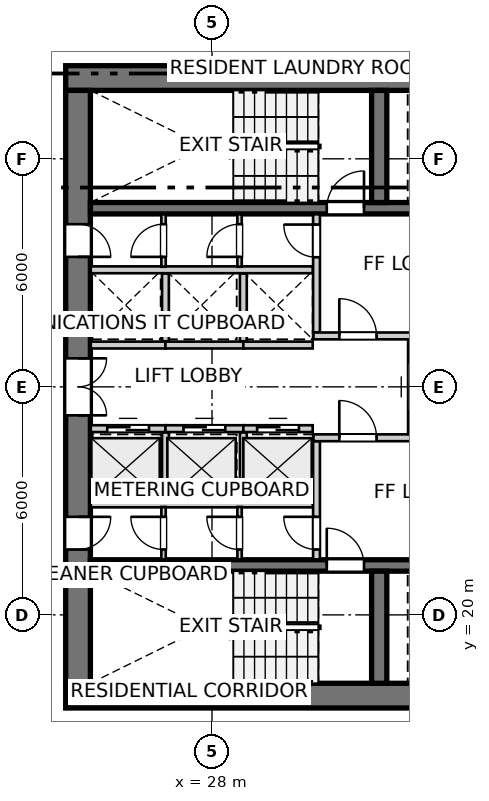
"""IFC4 building model, lengths in metres.
Left out: names, types, materials, properties, quantities, classifications, styles, units other than length and angle.
Written with IfcOpenShell. Run it as: python <this file> out.ifc"""

import sys

from ifc_helpers import new_model, si_unit, direction, frame, frame_2d, origin, place, context, subcontext, project, spatial, rectangle, extrude, source, transform, mapped, element, fill, save


model = new_model("IFC4")
c1 = context("Model", 3, precision=1e-05, world=origin(), true_north=direction((0.0, 1.0)))
c2 = subcontext(c1, "Body", "Model", "MODEL_VIEW")
j1 = project(units=[si_unit("LENGTHUNIT", "METRE"), si_unit("PLANEANGLEUNIT", "RADIAN")], contexts=[c1])
p1 = place(None, origin())
s1 = spatial("IfcSite", under=j1, at=p1, CompositionType="ELEMENT")
p2 = place(p1, origin())
s2 = spatial("IfcBuilding", under=s1, at=p2, CompositionType="ELEMENT")
p3 = place(p2, frame((0.0, 0.0, 89.6)))
s3 = spatial("IfcBuildingStorey", under=s2, at=p3, CompositionType="ELEMENT", Elevation=89.6)
for number, where, z_axis, x_axis in (
    (1, (24.15, 17.875, 0.0), (0.0, 0.0, 1.0), (1.0, 0.0, 0.0)),
    (2, (36.55, 34.125, 0.0), (0.0, 0.0, 1.0), (-1.0, 0.0, 0.0)),
):
    element("IfcWall", number, at=place(p3, frame(where, z_axis=z_axis, x_axis=x_axis)), inside=s3, PredefinedType="SHEAR", context=c2, shape_type="SweptSolid", body=[
        extrude(rectangle(XDim=12.4, YDim=0.65, at=frame_2d((6.2, 0.0))), origin(), (0.0, 0.0, 1.0), 2.95),
    ])
p4 = place(p3, frame((24.475, 33.8, 0.0), z_axis=(0.0, 0.0, 1.0), x_axis=(0.0, -1.0, 0.0)))
e3 = element("IfcWall", 3, at=p4, inside=s3, PredefinedType="SHEAR", context=c2, shape_type="SweptSolid", body=[
    extrude(rectangle(XDim=15.6, YDim=0.65, at=frame_2d((7.8, 0.0))), origin(), (0.0, 0.0, 1.0), 2.95),
])
p5 = place(p4, frame((7.05, 0.0, 0.0)))
e4 = element("IfcOpeningElement", 4, at=p5, cuts=e3, PredefinedType="OPENING", context=c2, shape_type="SweptSolid", body=[
    extrude(rectangle(XDim=1.5, YDim=2.15, at=frame_2d((0.75, 1.075))), frame((0.0, 0.335, 0.0), z_axis=(0.0, -1.0, 0.0), x_axis=(1.0, 0.0, 0.0)), (0.0, 0.0, 1.0), 0.67),
])
p6 = place(p4, frame((3.52, 0.0, 0.0)))
e5 = element("IfcOpeningElement", 5, at=p6, cuts=e3, PredefinedType="OPENING", context=c2, shape_type="SweptSolid", body=[
    extrude(rectangle(XDim=0.86, YDim=2.05, at=frame_2d((0.43, 1.025))), frame((0.0, 0.335, 0.0), z_axis=(0.0, -1.0, 0.0), x_axis=(1.0, 0.0, 0.0)), (0.0, 0.0, 1.0), 0.67),
])
p7 = place(p4, frame((11.22, 0.0, 0.0)))
e6 = element("IfcOpeningElement", 6, at=p7, cuts=e3, PredefinedType="OPENING", context=c2, shape_type="SweptSolid", body=[
    extrude(rectangle(XDim=0.86, YDim=2.05, at=frame_2d((0.43, 1.025))), frame((0.0, 0.335, 0.0), z_axis=(0.0, -1.0, 0.0), x_axis=(1.0, 0.0, 0.0)), (0.0, 0.0, 1.0), 0.67),
])
p8 = place(p3, frame((24.8, 21.3, 0.0), z_axis=(0.0, 0.0, 1.0), x_axis=(1.0, 0.0, 0.0)))
e7 = element("IfcWall", 7, at=p8, inside=s3, PredefinedType="SHEAR", context=c2, shape_type="SweptSolid", body=[
    extrude(rectangle(XDim=11.1, YDim=0.3, at=frame_2d((5.55, 0.0))), origin(), (0.0, 0.0, 1.0), 2.95),
])
p9 = place(p8, frame((6.22, 0.0, 0.0)))
e8 = element("IfcOpeningElement", 8, at=p9, cuts=e7, PredefinedType="OPENING", context=c2, shape_type="SweptSolid", body=[
    extrude(rectangle(XDim=0.98, YDim=2.15, at=frame_2d((0.49, 1.075))), frame((0.0, 0.16, 0.0), z_axis=(0.0, -1.0, 0.0), x_axis=(1.0, 0.0, 0.0)), (0.0, 0.0, 1.0), 0.32),
])
p10 = place(p8, frame((9.15, 0.0, 0.0)))
e9 = element("IfcOpeningElement", 9, at=p10, cuts=e7, PredefinedType="OPENING", context=c2, shape_type="SweptSolid", body=[
    extrude(rectangle(XDim=1.15, YDim=2.15, at=frame_2d((0.575, 1.075))), frame((0.0, 0.16, 0.0), z_axis=(0.0, -1.0, 0.0), x_axis=(1.0, 0.0, 0.0)), (0.0, 0.0, 1.0), 0.32),
])
p11 = place(p3, frame((32.4, 18.2, 0.0), z_axis=(0.0, 0.0, 1.0), x_axis=(0.0, 1.0, 0.0)))
e10 = element("IfcWall", 10, at=p11, inside=s3, PredefinedType="SHEAR", context=c2, shape_type="SweptSolid", body=[
    extrude(rectangle(XDim=2.95, YDim=0.4, at=frame_2d((1.475, 0.0))), origin(), (0.0, 0.0, 1.0), 2.95),
])
p12 = place(p3, frame((24.8, 30.7, 0.0), z_axis=(0.0, 0.0, 1.0), x_axis=(1.0, 0.0, 0.0)))
e11 = element("IfcWall", 11, at=p12, inside=s3, PredefinedType="SHEAR", context=c2, shape_type="SweptSolid", body=[
    extrude(rectangle(XDim=11.1, YDim=0.3, at=frame_2d((5.55, 0.0))), origin(), (0.0, 0.0, 1.0), 2.95),
])
p13 = place(p12, frame((6.22, 0.0, 0.0)))
e12 = element("IfcOpeningElement", 12, at=p13, cuts=e11, PredefinedType="OPENING", context=c2, shape_type="SweptSolid", body=[
    extrude(rectangle(XDim=0.98, YDim=2.15, at=frame_2d((0.49, 1.075))), frame((0.0, 0.16, 0.0), z_axis=(0.0, -1.0, 0.0), x_axis=(1.0, 0.0, 0.0)), (0.0, 0.0, 1.0), 0.32),
])
p14 = place(p12, frame((9.15, 0.0, 0.0)))
e13 = element("IfcOpeningElement", 13, at=p14, cuts=e11, PredefinedType="OPENING", context=c2, shape_type="SweptSolid", body=[
    extrude(rectangle(XDim=1.15, YDim=2.15, at=frame_2d((0.575, 1.075))), frame((0.0, 0.16, 0.0), z_axis=(0.0, -1.0, 0.0), x_axis=(1.0, 0.0, 0.0)), (0.0, 0.0, 1.0), 0.32),
])
p15 = place(p3, frame((32.4, 30.85, 0.0), z_axis=(0.0, 0.0, 1.0), x_axis=(0.0, 1.0, 0.0)))
e14 = element("IfcWall", 14, at=p15, inside=s3, PredefinedType="SHEAR", context=c2, shape_type="SweptSolid", body=[
    extrude(rectangle(XDim=2.95, YDim=0.4, at=frame_2d((1.475, 0.0))), origin(), (0.0, 0.0, 1.0), 2.95),
])
p16 = place(p3, frame((30.75, 21.46, 0.0), z_axis=(0.0, 0.0, 1.0), x_axis=(0.0, 1.0, 0.0)))
e15 = element("IfcWall", 15, at=p16, inside=s3, PredefinedType="PARTITIONING", context=c2, shape_type="SweptSolid", body=[
    extrude(rectangle(XDim=3.11, YDim=0.18, at=frame_2d((1.555, 0.0))), origin(), (0.0, 0.0, 1.0), 2.95),
])
p17 = place(p16, frame((0.26, 0.0, 0.0)))
e16 = element("IfcOpeningElement", 16, at=p17, cuts=e15, PredefinedType="OPENING", context=c2, shape_type="SweptSolid", body=[
    extrude(rectangle(XDim=0.86, YDim=2.05, at=frame_2d((0.43, 1.025))), frame((0.0, 0.1, 0.0), z_axis=(0.0, -1.0, 0.0), x_axis=(1.0, 0.0, 0.0)), (0.0, 0.0, 1.0), 0.2),
])
p18 = place(p3, frame((30.67, 24.66, 0.0), z_axis=(0.0, 0.0, 1.0), x_axis=(1.0, 0.0, 0.0)))
e17 = element("IfcWall", 17, at=p18, inside=s3, PredefinedType="PARTITIONING", context=c2, shape_type="SweptSolid", body=[
    extrude(rectangle(XDim=5.22, YDim=0.18, at=frame_2d((2.61, 0.0))), origin(), (0.0, 0.0, 1.0), 2.95),
])
p19 = place(p18, frame((0.68, 0.0, 0.0)))
e18 = element("IfcOpeningElement", 18, at=p19, cuts=e17, PredefinedType="OPENING", context=c2, shape_type="SweptSolid", body=[
    extrude(rectangle(XDim=0.98, YDim=2.15, at=frame_2d((0.49, 1.075))), frame((0.0, 0.1, 0.0), z_axis=(0.0, -1.0, 0.0), x_axis=(1.0, 0.0, 0.0)), (0.0, 0.0, 1.0), 0.2),
])
p20 = place(p3, frame((30.75, 27.43, 0.0), z_axis=(0.0, 0.0, 1.0), x_axis=(0.0, 1.0, 0.0)))
e19 = element("IfcWall", 19, at=p20, inside=s3, PredefinedType="PARTITIONING", context=c2, shape_type="SweptSolid", body=[
    extrude(rectangle(XDim=3.11, YDim=0.18, at=frame_2d((1.555, 0.0))), origin(), (0.0, 0.0, 1.0), 2.95),
])
p21 = place(p20, frame((1.98, 0.0, 0.0)))
e20 = element("IfcOpeningElement", 20, at=p21, cuts=e19, PredefinedType="OPENING", context=c2, shape_type="SweptSolid", body=[
    extrude(rectangle(XDim=0.86, YDim=2.05, at=frame_2d((0.43, 1.025))), frame((0.0, 0.1, 0.0), z_axis=(0.0, -1.0, 0.0), x_axis=(1.0, 0.0, 0.0)), (0.0, 0.0, 1.0), 0.2),
])
p22 = place(p3, frame((30.67, 27.34, 0.0), z_axis=(0.0, 0.0, 1.0), x_axis=(1.0, 0.0, 0.0)))
e21 = element("IfcWall", 21, at=p22, inside=s3, PredefinedType="PARTITIONING", context=c2, shape_type="SweptSolid", body=[
    extrude(rectangle(XDim=5.22, YDim=0.18, at=frame_2d((2.61, 0.0))), origin(), (0.0, 0.0, 1.0), 2.95),
])
p23 = place(p22, frame((0.68, 0.0, 0.0)))
e22 = element("IfcOpeningElement", 22, at=p23, cuts=e21, PredefinedType="OPENING", context=c2, shape_type="SweptSolid", body=[
    extrude(rectangle(XDim=0.98, YDim=2.15, at=frame_2d((0.49, 1.075))), frame((0.0, 0.1, 0.0), z_axis=(0.0, -1.0, 0.0), x_axis=(1.0, 0.0, 0.0)), (0.0, 0.0, 1.0), 0.2),
])
p24 = place(p3, frame((33.25, 24.76, 0.0), z_axis=(0.0, 0.0, 1.0), x_axis=(0.0, 1.0, 0.0)))
e23 = element("IfcWall", 23, at=p24, inside=s3, PredefinedType="PARTITIONING", context=c2, shape_type="SweptSolid", body=[
    extrude(rectangle(XDim=2.48, YDim=0.18, at=frame_2d((1.24, 0.0))), origin(), (0.0, 0.0, 1.0), 2.95),
])
p25 = place(p24, frame((0.615, 0.0, 0.0)))
e24 = element("IfcOpeningElement", 24, at=p25, cuts=e23, PredefinedType="OPENING", context=c2, shape_type="SweptSolid", body=[
    extrude(rectangle(XDim=1.25, YDim=2.15, at=frame_2d((0.625, 1.075))), frame((0.0, 0.1, 0.0), z_axis=(0.0, -1.0, 0.0), x_axis=(1.0, 0.0, 0.0)), (0.0, 0.0, 1.0), 0.2),
])
p26 = place(p3, frame((24.81, 22.92, 0.0), z_axis=(0.0, 0.0, 1.0), x_axis=(1.0, 0.0, 0.0)))
e25 = element("IfcWall", 25, at=p26, inside=s3, PredefinedType="PARTITIONING", context=c2, shape_type="SweptSolid", body=[
    extrude(rectangle(XDim=5.84, YDim=0.18, at=frame_2d((2.92, 0.0))), origin(), (0.0, 0.0, 1.0), 2.95),
])
p27 = place(p3, frame((24.81, 24.9, 0.0), z_axis=(0.0, 0.0, 1.0), x_axis=(1.0, 0.0, 0.0)))
e26 = element("IfcWall", 26, at=p27, inside=s3, PredefinedType="PARTITIONING", context=c2, shape_type="SweptSolid", body=[
    extrude(rectangle(XDim=1.965, YDim=0.18, at=frame_2d((0.982, 0.0))), origin(), (0.0, 0.0, 1.0), 2.95),
])
p28 = place(p27, frame((0.433, 0.0, 0.0)))
e27 = element("IfcOpeningElement", 27, at=p28, cuts=e26, PredefinedType="OPENING", context=c2, shape_type="SweptSolid", body=[
    extrude(rectangle(XDim=1.1, YDim=2.15, at=frame_2d((0.55, 1.075))), frame((0.0, 0.1, 0.0), z_axis=(0.0, -1.0, 0.0), x_axis=(1.0, 0.0, 0.0)), (0.0, 0.0, 1.0), 0.2),
])
p29 = place(p3, frame((26.775, 24.9, 0.0), z_axis=(0.0, 0.0, 1.0), x_axis=(1.0, 0.0, 0.0)))
e28 = element("IfcWall", 28, at=p29, inside=s3, PredefinedType="PARTITIONING", context=c2, shape_type="SweptSolid", body=[
    extrude(rectangle(XDim=2.05, YDim=0.18, at=frame_2d((1.025, 0.0))), origin(), (0.0, 0.0, 1.0), 2.95),
])
p30 = place(p29, frame((0.475, 0.0, 0.0)))
e29 = element("IfcOpeningElement", 29, at=p30, cuts=e28, PredefinedType="OPENING", context=c2, shape_type="SweptSolid", body=[
    extrude(rectangle(XDim=1.1, YDim=2.15, at=frame_2d((0.55, 1.075))), frame((0.0, 0.1, 0.0), z_axis=(0.0, -1.0, 0.0), x_axis=(1.0, 0.0, 0.0)), (0.0, 0.0, 1.0), 0.2),
])
p31 = place(p3, frame((26.775, 23.02, 0.0), z_axis=(0.0, 0.0, 1.0), x_axis=(0.0, 1.0, 0.0)))
e30 = element("IfcWall", 30, at=p31, inside=s3, PredefinedType="PARTITIONING", context=c2, shape_type="SweptSolid", body=[
    extrude(rectangle(XDim=1.78, YDim=0.18, at=frame_2d((0.89, 0.0))), origin(), (0.0, 0.0, 1.0), 2.95),
])
p32 = place(p3, frame((28.825, 24.9, 0.0), z_axis=(0.0, 0.0, 1.0), x_axis=(1.0, 0.0, 0.0)))
e31 = element("IfcWall", 31, at=p32, inside=s3, PredefinedType="PARTITIONING", context=c2, shape_type="SweptSolid", body=[
    extrude(rectangle(XDim=1.825, YDim=0.18, at=frame_2d((0.913, 0.0))), origin(), (0.0, 0.0, 1.0), 2.95),
])
p33 = place(p32, frame((0.363, 0.0, 0.0)))
e32 = element("IfcOpeningElement", 32, at=p33, cuts=e31, PredefinedType="OPENING", context=c2, shape_type="SweptSolid", body=[
    extrude(rectangle(XDim=1.1, YDim=2.15, at=frame_2d((0.55, 1.075))), frame((0.0, 0.1, 0.0), z_axis=(0.0, -1.0, 0.0), x_axis=(1.0, 0.0, 0.0)), (0.0, 0.0, 1.0), 0.2),
])
p34 = place(p3, frame((28.825, 23.02, 0.0), z_axis=(0.0, 0.0, 1.0), x_axis=(0.0, 1.0, 0.0)))
e33 = element("IfcWall", 33, at=p34, inside=s3, PredefinedType="PARTITIONING", context=c2, shape_type="SweptSolid", body=[
    extrude(rectangle(XDim=1.78, YDim=0.18, at=frame_2d((0.89, 0.0))), origin(), (0.0, 0.0, 1.0), 2.95),
])
p35 = place(p3, frame((24.81, 29.08, 0.0), z_axis=(0.0, 0.0, 1.0), x_axis=(1.0, 0.0, 0.0)))
e34 = element("IfcWall", 34, at=p35, inside=s3, PredefinedType="PARTITIONING", context=c2, shape_type="SweptSolid", body=[
    extrude(rectangle(XDim=5.84, YDim=0.18, at=frame_2d((2.92, 0.0))), origin(), (0.0, 0.0, 1.0), 2.95),
])
p36 = place(p3, frame((24.81, 27.1, 0.0), z_axis=(0.0, 0.0, 1.0), x_axis=(1.0, 0.0, 0.0)))
e35 = element("IfcWall", 35, at=p36, inside=s3, PredefinedType="PARTITIONING", context=c2, shape_type="SweptSolid", body=[
    extrude(rectangle(XDim=1.965, YDim=0.18, at=frame_2d((0.982, 0.0))), origin(), (0.0, 0.0, 1.0), 2.95),
])
p37 = place(p3, frame((26.775, 27.1, 0.0), z_axis=(0.0, 0.0, 1.0), x_axis=(1.0, 0.0, 0.0)))
e36 = element("IfcWall", 36, at=p37, inside=s3, PredefinedType="PARTITIONING", context=c2, shape_type="SweptSolid", body=[
    extrude(rectangle(XDim=2.05, YDim=0.18, at=frame_2d((1.025, 0.0))), origin(), (0.0, 0.0, 1.0), 2.95),
])
p38 = place(p3, frame((26.775, 27.2, 0.0), z_axis=(0.0, 0.0, 1.0), x_axis=(0.0, 1.0, 0.0)))
e37 = element("IfcWall", 37, at=p38, inside=s3, PredefinedType="PARTITIONING", context=c2, shape_type="SweptSolid", body=[
    extrude(rectangle(XDim=1.78, YDim=0.18, at=frame_2d((0.89, 0.0))), origin(), (0.0, 0.0, 1.0), 2.95),
])
p39 = place(p3, frame((28.825, 27.1, 0.0), z_axis=(0.0, 0.0, 1.0), x_axis=(1.0, 0.0, 0.0)))
e38 = element("IfcWall", 38, at=p39, inside=s3, PredefinedType="PARTITIONING", context=c2, shape_type="SweptSolid", body=[
    extrude(rectangle(XDim=1.825, YDim=0.18, at=frame_2d((0.913, 0.0))), origin(), (0.0, 0.0, 1.0), 2.95),
])
p40 = place(p3, frame((28.825, 27.2, 0.0), z_axis=(0.0, 0.0, 1.0), x_axis=(0.0, 1.0, 0.0)))
e39 = element("IfcWall", 39, at=p40, inside=s3, PredefinedType="PARTITIONING", context=c2, shape_type="SweptSolid", body=[
    extrude(rectangle(XDim=1.78, YDim=0.18, at=frame_2d((0.89, 0.0))), origin(), (0.0, 0.0, 1.0), 2.95),
])
p41 = place(p3, frame((26.725, 21.46, 0.0), z_axis=(0.0, 0.0, 1.0), x_axis=(0.0, 1.0, 0.0)))
e40 = element("IfcWall", 40, at=p41, inside=s3, PredefinedType="PARTITIONING", context=c2, shape_type="SweptSolid", body=[
    extrude(rectangle(XDim=1.38, YDim=0.115, at=frame_2d((0.69, 0.0))), origin(), (0.0, 0.0, 1.0), 2.95),
])
p42 = place(p41, frame((0.26, 0.0, 0.0)))
e41 = element("IfcOpeningElement", 41, at=p42, cuts=e40, PredefinedType="OPENING", context=c2, shape_type="SweptSolid", body=[
    extrude(rectangle(XDim=0.86, YDim=2.05, at=frame_2d((0.43, 1.025))), frame((0.0, 0.067, 0.0), z_axis=(0.0, -1.0, 0.0), x_axis=(1.0, 0.0, 0.0)), (0.0, 0.0, 1.0), 0.135),
])
p43 = place(p3, frame((26.725, 29.16, 0.0), z_axis=(0.0, 0.0, 1.0), x_axis=(0.0, 1.0, 0.0)))
e42 = element("IfcWall", 42, at=p43, inside=s3, PredefinedType="PARTITIONING", context=c2, shape_type="SweptSolid", body=[
    extrude(rectangle(XDim=1.38, YDim=0.115, at=frame_2d((0.69, 0.0))), origin(), (0.0, 0.0, 1.0), 2.95),
])
p44 = place(p43, frame((0.26, 0.0, 0.0)))
e43 = element("IfcOpeningElement", 43, at=p44, cuts=e42, PredefinedType="OPENING", context=c2, shape_type="SweptSolid", body=[
    extrude(rectangle(XDim=0.86, YDim=2.05, at=frame_2d((0.43, 1.025))), frame((0.0, 0.067, 0.0), z_axis=(0.0, -1.0, 0.0), x_axis=(1.0, 0.0, 0.0)), (0.0, 0.0, 1.0), 0.135),
])
p45 = place(p3, frame((28.725, 21.46, 0.0), z_axis=(0.0, 0.0, 1.0), x_axis=(0.0, 1.0, 0.0)))
e44 = element("IfcWall", 44, at=p45, inside=s3, PredefinedType="PARTITIONING", context=c2, shape_type="SweptSolid", body=[
    extrude(rectangle(XDim=1.38, YDim=0.115, at=frame_2d((0.69, 0.0))), origin(), (0.0, 0.0, 1.0), 2.95),
])
p46 = place(p45, frame((0.26, 0.0, 0.0)))
e45 = element("IfcOpeningElement", 45, at=p46, cuts=e44, PredefinedType="OPENING", context=c2, shape_type="SweptSolid", body=[
    extrude(rectangle(XDim=0.86, YDim=2.05, at=frame_2d((0.43, 1.025))), frame((0.0, 0.067, 0.0), z_axis=(0.0, -1.0, 0.0), x_axis=(1.0, 0.0, 0.0)), (0.0, 0.0, 1.0), 0.135),
])
p47 = place(p3, frame((28.725, 29.16, 0.0), z_axis=(0.0, 0.0, 1.0), x_axis=(0.0, 1.0, 0.0)))
e46 = element("IfcWall", 46, at=p47, inside=s3, PredefinedType="PARTITIONING", context=c2, shape_type="SweptSolid", body=[
    extrude(rectangle(XDim=1.38, YDim=0.115, at=frame_2d((0.69, 0.0))), origin(), (0.0, 0.0, 1.0), 2.95),
])
p48 = place(p47, frame((0.26, 0.0, 0.0)))
e47 = element("IfcOpeningElement", 47, at=p48, cuts=e46, PredefinedType="OPENING", context=c2, shape_type="SweptSolid", body=[
    extrude(rectangle(XDim=0.86, YDim=2.05, at=frame_2d((0.43, 1.025))), frame((0.0, 0.067, 0.0), z_axis=(0.0, -1.0, 0.0), x_axis=(1.0, 0.0, 0.0)), (0.0, 0.0, 1.0), 0.135),
])
m1 = source(origin(), c2, "Body", "SweptSolid", [
    extrude(rectangle(XDim=0.98, YDim=2.15, at=frame_2d((0.49, 1.075))), frame((0.0, 0.025, 0.0), z_axis=(0.0, -1.0, 0.0), x_axis=(1.0, 0.0, 0.0)), (0.0, 0.0, 1.0), 0.05),
])
p49 = place(p9, origin())
e48 = element("IfcDoor", 48, at=p49, inside=s3, OperationType="SINGLE_SWING_LEFT", PredefinedType="DOOR", context=c2, shape_type="MappedRepresentation", body=[
    mapped(m1, transform((0.0, 0.0, 0.0), x_axis=(1.0, 0.0, 0.0), y_axis=(0.0, 1.0, 0.0), z_axis=(0.0, 0.0, 1.0), scale=1.0)),
])
fill(e8, e48)
p50 = place(p13, origin())
e49 = element("IfcDoor", 49, at=p50, inside=s3, OperationType="SINGLE_SWING_RIGHT", PredefinedType="DOOR", context=c2, shape_type="MappedRepresentation", body=[
    mapped(m1, transform((0.0, 0.0, 0.0), x_axis=(1.0, 0.0, 0.0), y_axis=(0.0, 1.0, 0.0), z_axis=(0.0, 0.0, 1.0), scale=1.0)),
])
fill(e12, e49)
m2 = source(origin(), c2, "Body", "SweptSolid", [
    extrude(rectangle(XDim=1.5, YDim=2.15, at=frame_2d((0.75, 1.075))), frame((0.0, 0.025, 0.0), z_axis=(0.0, -1.0, 0.0), x_axis=(1.0, 0.0, 0.0)), (0.0, 0.0, 1.0), 0.05),
])
p51 = place(p5, origin())
e50 = element("IfcDoor", 50, at=p51, inside=s3, OperationType="DOUBLE_DOOR_SINGLE_SWING", PredefinedType="DOOR", context=c2, shape_type="MappedRepresentation", body=[
    mapped(m2, transform((0.0, 0.0, 0.0), x_axis=(1.0, 0.0, 0.0), y_axis=(0.0, 1.0, 0.0), z_axis=(0.0, 0.0, 1.0), scale=1.0)),
])
fill(e4, e50)
m3 = source(origin(), c2, "Body", "SweptSolid", [
    extrude(rectangle(XDim=0.86, YDim=2.05, at=frame_2d((0.43, 1.025))), frame((0.0, 0.025, 0.0), z_axis=(0.0, -1.0, 0.0), x_axis=(1.0, 0.0, 0.0)), (0.0, 0.0, 1.0), 0.05),
])
p52 = place(p6, origin())
e51 = element("IfcDoor", 51, at=p52, inside=s3, OperationType="SINGLE_SWING_RIGHT", PredefinedType="DOOR", context=c2, shape_type="MappedRepresentation", body=[
    mapped(m3, transform((0.0, 0.0, 0.0), x_axis=(1.0, 0.0, 0.0), y_axis=(0.0, 1.0, 0.0), z_axis=(0.0, 0.0, 1.0), scale=1.0)),
])
fill(e5, e51)
p53 = place(p7, origin())
e52 = element("IfcDoor", 52, at=p53, inside=s3, OperationType="SINGLE_SWING_LEFT", PredefinedType="DOOR", context=c2, shape_type="MappedRepresentation", body=[
    mapped(m3, transform((0.0, 0.0, 0.0), x_axis=(1.0, 0.0, 0.0), y_axis=(0.0, 1.0, 0.0), z_axis=(0.0, 0.0, 1.0), scale=1.0)),
])
fill(e6, e52)
p54 = place(p17, origin())
e53 = element("IfcDoor", 53, at=p54, inside=s3, OperationType="SINGLE_SWING_RIGHT", PredefinedType="DOOR", context=c2, shape_type="MappedRepresentation", body=[
    mapped(m3, transform((0.0, 0.0, 0.0), x_axis=(1.0, 0.0, 0.0), y_axis=(0.0, 1.0, 0.0), z_axis=(0.0, 0.0, 1.0), scale=1.0)),
])
fill(e16, e53)
p55 = place(p19, origin())
e54 = element("IfcDoor", 54, at=p55, inside=s3, OperationType="SINGLE_SWING_LEFT", PredefinedType="DOOR", context=c2, shape_type="MappedRepresentation", body=[
    mapped(m1, transform((0.0, 0.0, 0.0), x_axis=(1.0, 0.0, 0.0), y_axis=(0.0, 1.0, 0.0), z_axis=(0.0, 0.0, 1.0), scale=1.0)),
])
fill(e18, e54)
p56 = place(p21, origin())
e55 = element("IfcDoor", 55, at=p56, inside=s3, OperationType="SINGLE_SWING_RIGHT", PredefinedType="DOOR", context=c2, shape_type="MappedRepresentation", body=[
    mapped(m3, transform((0.0, 0.0, 0.0), x_axis=(1.0, 0.0, 0.0), y_axis=(0.0, 1.0, 0.0), z_axis=(0.0, 0.0, 1.0), scale=1.0)),
])
fill(e20, e55)
p57 = place(p23, origin())
e56 = element("IfcDoor", 56, at=p57, inside=s3, OperationType="SINGLE_SWING_LEFT", PredefinedType="DOOR", context=c2, shape_type="MappedRepresentation", body=[
    mapped(m1, transform((0.0, 0.0, 0.0), x_axis=(1.0, 0.0, 0.0), y_axis=(0.0, 1.0, 0.0), z_axis=(0.0, 0.0, 1.0), scale=1.0)),
])
fill(e22, e56)
m4 = source(origin(), c2, "Body", "SweptSolid", [
    extrude(rectangle(XDim=1.1, YDim=2.15, at=frame_2d((0.55, 1.075))), frame((0.0, 0.025, 0.0), z_axis=(0.0, -1.0, 0.0), x_axis=(1.0, 0.0, 0.0)), (0.0, 0.0, 1.0), 0.05),
])
p58 = place(p28, origin())
e57 = element("IfcDoor", 57, at=p58, inside=s3, OperationType="DOUBLE_DOOR_SLIDING", PredefinedType="DOOR", context=c2, shape_type="MappedRepresentation", body=[
    mapped(m4, transform((0.0, 0.0, 0.0), x_axis=(1.0, 0.0, 0.0), y_axis=(0.0, 1.0, 0.0), z_axis=(0.0, 0.0, 1.0), scale=1.0)),
])
fill(e27, e57)
p59 = place(p30, origin())
e58 = element("IfcDoor", 58, at=p59, inside=s3, OperationType="DOUBLE_DOOR_SLIDING", PredefinedType="DOOR", context=c2, shape_type="MappedRepresentation", body=[
    mapped(m4, transform((0.0, 0.0, 0.0), x_axis=(1.0, 0.0, 0.0), y_axis=(0.0, 1.0, 0.0), z_axis=(0.0, 0.0, 1.0), scale=1.0)),
])
fill(e29, e58)
p60 = place(p33, origin())
e59 = element("IfcDoor", 59, at=p60, inside=s3, OperationType="DOUBLE_DOOR_SLIDING", PredefinedType="DOOR", context=c2, shape_type="MappedRepresentation", body=[
    mapped(m4, transform((0.0, 0.0, 0.0), x_axis=(1.0, 0.0, 0.0), y_axis=(0.0, 1.0, 0.0), z_axis=(0.0, 0.0, 1.0), scale=1.0)),
])
fill(e32, e59)
p61 = place(p42, origin())
e60 = element("IfcDoor", 60, at=p61, inside=s3, OperationType="SINGLE_SWING_RIGHT", PredefinedType="DOOR", context=c2, shape_type="MappedRepresentation", body=[
    mapped(m3, transform((0.0, 0.0, 0.0), x_axis=(1.0, 0.0, 0.0), y_axis=(0.0, 1.0, 0.0), z_axis=(0.0, 0.0, 1.0), scale=1.0)),
])
fill(e41, e60)
p62 = place(p44, origin())
e61 = element("IfcDoor", 61, at=p62, inside=s3, OperationType="SINGLE_SWING_LEFT", PredefinedType="DOOR", context=c2, shape_type="MappedRepresentation", body=[
    mapped(m3, transform((0.0, 0.0, 0.0), x_axis=(1.0, 0.0, 0.0), y_axis=(0.0, 1.0, 0.0), z_axis=(0.0, 0.0, 1.0), scale=1.0)),
])
fill(e43, e61)
p63 = place(p46, origin())
e62 = element("IfcDoor", 62, at=p63, inside=s3, OperationType="SINGLE_SWING_RIGHT", PredefinedType="DOOR", context=c2, shape_type="MappedRepresentation", body=[
    mapped(m3, transform((0.0, 0.0, 0.0), x_axis=(1.0, 0.0, 0.0), y_axis=(0.0, 1.0, 0.0), z_axis=(0.0, 0.0, 1.0), scale=1.0)),
])
fill(e45, e62)
p64 = place(p48, origin())
e63 = element("IfcDoor", 63, at=p64, inside=s3, OperationType="SINGLE_SWING_LEFT", PredefinedType="DOOR", context=c2, shape_type="MappedRepresentation", body=[
    mapped(m3, transform((0.0, 0.0, 0.0), x_axis=(1.0, 0.0, 0.0), y_axis=(0.0, 1.0, 0.0), z_axis=(0.0, 0.0, 1.0), scale=1.0)),
])
fill(e47, e63)
save(model, sys.argv[1])
